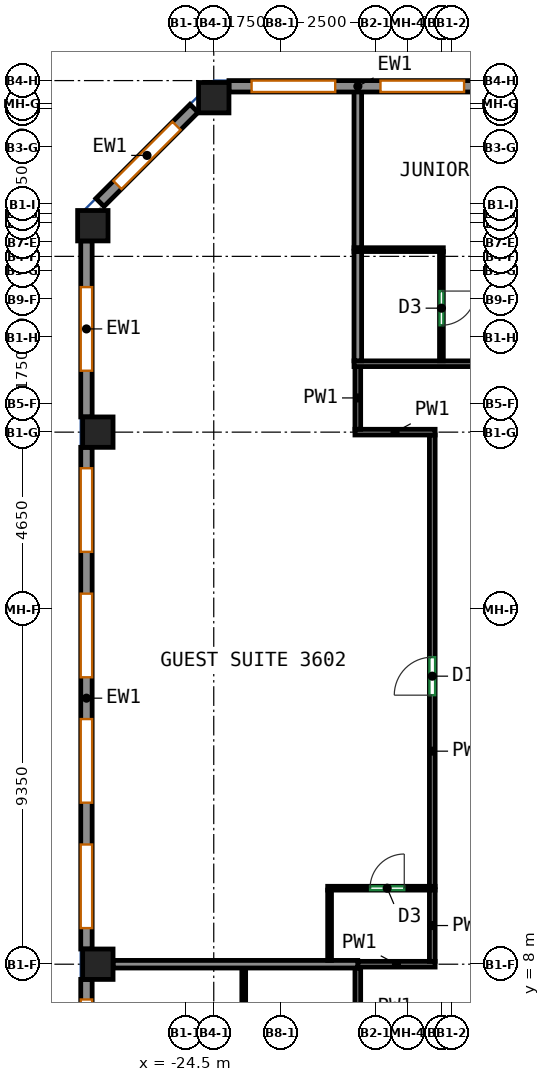
"""IFC4 building model, lengths in metres.
Left out: names, types, materials, properties, quantities, classifications, styles, units other than length and angle.
Written with IfcOpenShell. Run it as: python <this file> out.ifc"""

import sys

from ifc_helpers import new_model, si_unit, direction, frame, frame_2d, origin, origin_2d, place, context, subcontext, project, spatial, rectangle, extrude, source, transform, mapped, element, fill, save


model = new_model("IFC4")
c1 = context("Model", 3, precision=1e-05, world=origin(), true_north=direction((0.0, 1.0)))
c2 = subcontext(c1, "Body", "Model", "MODEL_VIEW")
j1 = project(units=[si_unit("LENGTHUNIT", "METRE"), si_unit("PLANEANGLEUNIT", "RADIAN")], contexts=[c1])
p1 = place(None, origin())
s1 = spatial("IfcSite", under=j1, at=p1, CompositionType="ELEMENT")
p2 = place(p1, origin())
s2 = spatial("IfcBuilding", under=s1, at=p2, CompositionType="ELEMENT")
p3 = place(p2, frame((0.0, 0.0, 157.5)))
s3 = spatial("IfcBuildingStorey", under=s2, at=p3, CompositionType="ELEMENT", Elevation=157.5)
m1 = source(origin(), c2, "Body", "SweptSolid", [
    extrude(rectangle(XDim=0.8, YDim=0.8, at=origin_2d()), origin(), (0.0, 0.0, 1.0), 3.12),
])
for number, where, z_axis, x_axis in (
    (1, (-26.932, 27.432, 0.0), (0.0, 0.0, 1.0), (1.0, 0.0, 0.0)),
    (2, (-26.8, 8.0, 0.0), (0.0, 0.0, 1.0), (1.0, 0.0, 0.0)),
    (3, (-26.8, 22.0, 0.0), (0.0, 0.0, 1.0), (1.0, 0.0, 0.0)),
    (4, (-23.75, 30.8, 0.0), (0.0, 0.0, 1.0), (1.0, 0.0, 0.0)),
):
    element("IfcColumn", number, at=place(p3, frame(where, z_axis=z_axis, x_axis=x_axis)), inside=s3, PredefinedType="COLUMN", context=c2, shape_type="MappedRepresentation", body=[
        mapped(m1, transform((0.0, 0.0, 0.0))),
    ])
m2 = source(origin(), c2, "Body", "SweptSolid", [
    extrude(rectangle(XDim=6.783, YDim=0.3, at=frame_2d((3.392, 0.0))), origin(), (0.0, 0.0, 1.0), 3.12),
])
p4 = place(p3, frame((-16.567, 31.1, 0.0), z_axis=(0.0, 0.0, 1.0), x_axis=(-1.0, 0.0, 0.0)))
e5 = element("IfcWall", 5, at=p4, inside=s3, PredefinedType="SOLIDWALL", context=c2, shape_type="MappedRepresentation", body=[
    mapped(m2, transform((0.0, 0.0, 0.0))),
])
p5 = place(p4, frame((0.596, 0.0, 0.85)))
e6 = element("IfcOpeningElement", 6, at=p5, cuts=e5, PredefinedType="OPENING", context=c2, shape_type="SweptSolid", body=[
    extrude(rectangle(XDim=2.2, YDim=1.95, at=frame_2d((1.1, 0.975))), frame((0.0, 0.16, 0.0), z_axis=(0.0, -1.0, 0.0), x_axis=(1.0, 0.0, 0.0)), (0.0, 0.0, 1.0), 0.32),
])
p6 = place(p4, frame((3.988, 0.0, 0.85)))
e7 = element("IfcOpeningElement", 7, at=p6, cuts=e5, PredefinedType="OPENING", context=c2, shape_type="SweptSolid", body=[
    extrude(rectangle(XDim=2.2, YDim=1.95, at=frame_2d((1.1, 0.975))), frame((0.0, 0.16, 0.0), z_axis=(0.0, -1.0, 0.0), x_axis=(1.0, 0.0, 0.0)), (0.0, 0.0, 1.0), 0.32),
])
m3 = source(origin(), c2, "Body", "SweptSolid", [
    extrude(rectangle(XDim=3.5, YDim=0.3, at=frame_2d((1.75, 0.0))), origin(), (0.0, 0.0, 1.0), 3.12),
])
p7 = place(p3, frame((-24.269, 30.519, 0.0), z_axis=(0.0, 0.0, 1.0), x_axis=(-0.707141656123, -0.70707190453, 0.0)))
e8 = element("IfcWall", 8, at=p7, inside=s3, PredefinedType="SOLIDWALL", context=c2, shape_type="MappedRepresentation", body=[
    mapped(m3, transform((0.0, 0.0, 0.0))),
])
p8 = place(p7, frame((0.65, 0.0, 0.85)))
e9 = element("IfcOpeningElement", 9, at=p8, cuts=e8, PredefinedType="OPENING", context=c2, shape_type="SweptSolid", body=[
    extrude(rectangle(XDim=2.2, YDim=1.95, at=frame_2d((1.1, 0.975))), frame((0.0, 0.16, 0.0), z_axis=(0.0, -1.0, 0.0), x_axis=(1.0, 0.0, 0.0)), (0.0, 0.0, 1.0), 0.32),
])
m4 = source(origin(), c2, "Body", "SweptSolid", [
    extrude(rectangle(XDim=4.632, YDim=0.3, at=frame_2d((2.316, 0.0))), origin(), (0.0, 0.0, 1.0), 3.12),
])
p9 = place(p3, frame((-27.1, 27.032, 0.0), z_axis=(0.0, 0.0, 1.0), x_axis=(0.0, -1.0, 0.0)))
e10 = element("IfcWall", 10, at=p9, inside=s3, PredefinedType="SOLIDWALL", context=c2, shape_type="MappedRepresentation", body=[
    mapped(m4, transform((0.0, 0.0, 0.0))),
])
p10 = place(p9, frame((1.216, 0.0, 0.85)))
e11 = element("IfcOpeningElement", 11, at=p10, cuts=e10, PredefinedType="OPENING", context=c2, shape_type="SweptSolid", body=[
    extrude(rectangle(XDim=2.2, YDim=1.95, at=frame_2d((1.1, 0.975))), frame((0.0, 0.16, 0.0), z_axis=(0.0, -1.0, 0.0), x_axis=(1.0, 0.0, 0.0)), (0.0, 0.0, 1.0), 0.32),
])
m5 = source(origin(), c2, "Body", "SweptSolid", [
    extrude(rectangle(XDim=13.2, YDim=0.3, at=frame_2d((6.6, 0.0))), origin(), (0.0, 0.0, 1.0), 3.12),
])
p11 = place(p3, frame((-27.1, 21.6, 0.0), z_axis=(0.0, 0.0, 1.0), x_axis=(0.0, -1.0, 0.0)))
e12 = element("IfcWall", 12, at=p11, inside=s3, PredefinedType="SOLIDWALL", context=c2, shape_type="MappedRepresentation", body=[
    mapped(m5, transform((0.0, 0.0, 0.0))),
])
p12 = place(p11, frame((0.55, 0.0, 0.85)))
e13 = element("IfcOpeningElement", 13, at=p12, cuts=e12, PredefinedType="OPENING", context=c2, shape_type="SweptSolid", body=[
    extrude(rectangle(XDim=2.2, YDim=1.95, at=frame_2d((1.1, 0.975))), frame((0.0, 0.16, 0.0), z_axis=(0.0, -1.0, 0.0), x_axis=(1.0, 0.0, 0.0)), (0.0, 0.0, 1.0), 0.32),
])
p13 = place(p11, frame((3.85, 0.0, 0.85)))
e14 = element("IfcOpeningElement", 14, at=p13, cuts=e12, PredefinedType="OPENING", context=c2, shape_type="SweptSolid", body=[
    extrude(rectangle(XDim=2.2, YDim=1.95, at=frame_2d((1.1, 0.975))), frame((0.0, 0.16, 0.0), z_axis=(0.0, -1.0, 0.0), x_axis=(1.0, 0.0, 0.0)), (0.0, 0.0, 1.0), 0.32),
])
p14 = place(p11, frame((7.15, 0.0, 0.85)))
e15 = element("IfcOpeningElement", 15, at=p14, cuts=e12, PredefinedType="OPENING", context=c2, shape_type="SweptSolid", body=[
    extrude(rectangle(XDim=2.2, YDim=1.95, at=frame_2d((1.1, 0.975))), frame((0.0, 0.16, 0.0), z_axis=(0.0, -1.0, 0.0), x_axis=(1.0, 0.0, 0.0)), (0.0, 0.0, 1.0), 0.32),
])
p15 = place(p11, frame((10.45, 0.0, 0.85)))
e16 = element("IfcOpeningElement", 16, at=p15, cuts=e12, PredefinedType="OPENING", context=c2, shape_type="SweptSolid", body=[
    extrude(rectangle(XDim=2.2, YDim=1.95, at=frame_2d((1.1, 0.975))), frame((0.0, 0.16, 0.0), z_axis=(0.0, -1.0, 0.0), x_axis=(1.0, 0.0, 0.0)), (0.0, 0.0, 1.0), 0.32),
])
m6 = source(origin(), c2, "Body", "SweptSolid", [
    extrude(rectangle(XDim=6.513, YDim=0.3, at=frame_2d((3.256, 0.0))), origin(), (0.0, 0.0, 1.0), 3.12),
])
p16 = place(p3, frame((-27.1, 7.6, 0.0), z_axis=(0.0, 0.0, 1.0), x_axis=(0.0, -1.0, 0.0)))
e17 = element("IfcWall", 17, at=p16, inside=s3, PredefinedType="SOLIDWALL", context=c2, shape_type="MappedRepresentation", body=[
    mapped(m6, transform((0.0, 0.0, 0.0))),
])
p17 = place(p16, frame((0.528, 0.0, 0.85)))
e18 = element("IfcOpeningElement", 18, at=p17, cuts=e17, PredefinedType="OPENING", context=c2, shape_type="SweptSolid", body=[
    extrude(rectangle(XDim=2.2, YDim=1.95, at=frame_2d((1.1, 0.975))), frame((0.0, 0.16, 0.0), z_axis=(0.0, -1.0, 0.0), x_axis=(1.0, 0.0, 0.0)), (0.0, 0.0, 1.0), 0.32),
])
p18 = place(p16, frame((3.784, 0.0, 0.85)))
e19 = element("IfcOpeningElement", 19, at=p18, cuts=e17, PredefinedType="OPENING", context=c2, shape_type="SweptSolid", body=[
    extrude(rectangle(XDim=2.2, YDim=1.95, at=frame_2d((1.1, 0.975))), frame((0.0, 0.16, 0.0), z_axis=(0.0, -1.0, 0.0), x_axis=(1.0, 0.0, 0.0)), (0.0, 0.0, 1.0), 0.32),
])
p19 = place(p3, frame((-19.959, 5.84, 0.0), z_axis=(0.0, 0.0, 1.0), x_axis=(0.0, 1.0, 0.0)))
e20 = element("IfcWall", 20, at=p19, inside=s3, PredefinedType="PARTITIONING", context=c2, shape_type="SweptSolid", body=[
    extrude(rectangle(XDim=2.06, YDim=0.15, at=frame_2d((1.03, 0.0))), origin(), (0.0, 0.0, 1.0), 3.12),
])
p20 = place(p3, frame((-18.0, 10.04, 0.0), z_axis=(0.0, 0.0, 1.0), x_axis=(0.0, 1.0, 0.0)))
e21 = element("IfcWall", 21, at=p20, inside=s3, PredefinedType="PARTITIONING", context=c2, shape_type="SweptSolid", body=[
    extrude(rectangle(XDim=11.885, YDim=0.15, at=frame_2d((5.942, 0.0))), origin(), (0.0, 0.0, 1.0), 3.12),
])
p21 = place(p20, frame((5.039, 0.0, 0.0)))
e22 = element("IfcOpeningElement", 22, at=p21, cuts=e21, PredefinedType="OPENING", context=c2, shape_type="SweptSolid", body=[
    extrude(rectangle(XDim=1.0, YDim=2.1, at=frame_2d((0.5, 1.05))), frame((0.0, 0.085, 0.0), z_axis=(0.0, -1.0, 0.0), x_axis=(1.0, 0.0, 0.0)), (0.0, 0.0, 1.0), 0.17),
])
p22 = place(p3, frame((-20.034, 22.0, 0.0), z_axis=(0.0, 0.0, 1.0), x_axis=(1.0, 0.0, 0.0)))
e23 = element("IfcWall", 23, at=p22, inside=s3, PredefinedType="PARTITIONING", context=c2, shape_type="SweptSolid", body=[
    extrude(rectangle(XDim=2.109, YDim=0.15, at=frame_2d((1.054, 0.0))), origin(), (0.0, 0.0, 1.0), 3.12),
])
p23 = place(p3, frame((-19.959, 22.075, 0.0), z_axis=(0.0, 0.0, 1.0), x_axis=(0.0, 1.0, 0.0)))
e24 = element("IfcWall", 24, at=p23, inside=s3, PredefinedType="PARTITIONING", context=c2, shape_type="SweptSolid", body=[
    extrude(rectangle(XDim=1.65, YDim=0.15, at=frame_2d((0.825, 0.0))), origin(), (0.0, 0.0, 1.0), 3.12),
])
p24 = place(p3, frame((-17.925, 8.0, 0.0), z_axis=(0.0, 0.0, 1.0), x_axis=(-1.0, 0.0, 0.0)))
e25 = element("IfcWall", 25, at=p24, inside=s3, PredefinedType="PARTITIONING", context=c2, shape_type="SweptSolid", body=[
    extrude(rectangle(XDim=2.034, YDim=0.15, at=frame_2d((1.017, 0.0))), origin(), (0.0, 0.0, 1.0), 3.12),
])
p25 = place(p3, frame((-18.0, 8.075, 0.0), z_axis=(0.0, 0.0, 1.0), x_axis=(0.0, 1.0, 0.0)))
e26 = element("IfcWall", 26, at=p25, inside=s3, PredefinedType="PARTITIONING", context=c2, shape_type="SweptSolid", body=[
    extrude(rectangle(XDim=1.885, YDim=0.15, at=frame_2d((0.942, 0.0))), origin(), (0.0, 0.0, 1.0), 3.12),
])
p26 = place(p3, frame((-20.059, 23.8, 0.0), z_axis=(0.0, 0.0, 1.0), x_axis=(1.0, 0.0, 0.0)))
e27 = element("IfcWall", 27, at=p26, inside=s3, PredefinedType="PARTITIONING", context=c2, shape_type="SweptSolid", body=[
    extrude(rectangle(XDim=41.909, YDim=0.15, at=frame_2d((20.955, 0.0))), origin(), (0.0, 0.0, 1.0), 3.12),
])
p27 = place(p26, frame((5.293, 0.0, 0.0)))
e28 = element("IfcOpeningElement", 28, at=p27, cuts=e27, PredefinedType="OPENING", context=c2, shape_type="SweptSolid", body=[
    extrude(rectangle(XDim=1.0, YDim=2.1, at=frame_2d((0.5, 1.05))), frame((0.0, 0.085, 0.0), z_axis=(0.0, -1.0, 0.0), x_axis=(1.0, 0.0, 0.0)), (0.0, 0.0, 1.0), 0.17),
])
p28 = place(p26, frame((9.275, 0.0, 0.0)))
e29 = element("IfcOpeningElement", 29, at=p28, cuts=e27, PredefinedType="OPENING", context=c2, shape_type="SweptSolid", body=[
    extrude(rectangle(XDim=1.0, YDim=2.1, at=frame_2d((0.5, 1.05))), frame((0.0, 0.085, 0.0), z_axis=(0.0, -1.0, 0.0), x_axis=(1.0, 0.0, 0.0)), (0.0, 0.0, 1.0), 0.17),
])
p29 = place(p26, frame((18.292, 0.0, 0.0)))
e30 = element("IfcOpeningElement", 30, at=p29, cuts=e27, PredefinedType="OPENING", context=c2, shape_type="SweptSolid", body=[
    extrude(rectangle(XDim=1.0, YDim=2.1, at=frame_2d((0.5, 1.05))), frame((0.0, 0.085, 0.0), z_axis=(0.0, -1.0, 0.0), x_axis=(1.0, 0.0, 0.0)), (0.0, 0.0, 1.0), 0.17),
])
p30 = place(p26, frame((30.636, 0.0, 0.0)))
e31 = element("IfcOpeningElement", 31, at=p30, cuts=e27, PredefinedType="OPENING", context=c2, shape_type="SweptSolid", body=[
    extrude(rectangle(XDim=1.0, YDim=2.1, at=frame_2d((0.5, 1.05))), frame((0.0, 0.085, 0.0), z_axis=(0.0, -1.0, 0.0), x_axis=(1.0, 0.0, 0.0)), (0.0, 0.0, 1.0), 0.17),
])
p31 = place(p26, frame((36.828, 0.0, 0.0)))
e32 = element("IfcOpeningElement", 32, at=p31, cuts=e27, PredefinedType="OPENING", context=c2, shape_type="SweptSolid", body=[
    extrude(rectangle(XDim=1.0, YDim=2.1, at=frame_2d((0.5, 1.05))), frame((0.0, 0.085, 0.0), z_axis=(0.0, -1.0, 0.0), x_axis=(1.0, 0.0, 0.0)), (0.0, 0.0, 1.0), 0.17),
])
p32 = place(p26, frame((38.314, 0.0, 0.0)))
e33 = element("IfcOpeningElement", 33, at=p32, cuts=e27, PredefinedType="OPENING", context=c2, shape_type="SweptSolid", body=[
    extrude(rectangle(XDim=1.0, YDim=2.1, at=frame_2d((0.5, 1.05))), frame((0.0, 0.085, 0.0), z_axis=(0.0, -1.0, 0.0), x_axis=(1.0, 0.0, 0.0)), (0.0, 0.0, 1.0), 0.17),
])
p33 = place(p3, frame((-22.961, 5.85, 0.0), z_axis=(0.0, 0.0, 1.0), x_axis=(0.0, 1.0, 0.0)))
e34 = element("IfcWall", 34, at=p33, inside=s3, PredefinedType="PARTITIONING", context=c2, shape_type="SweptSolid", body=[
    extrude(rectangle(XDim=2.05, YDim=0.1, at=frame_2d((1.025, 0.0))), origin(), (0.0, 0.0, 1.0), 3.12),
])
p34 = place(p3, frame((-26.4, 8.0, 0.0), z_axis=(0.0, 0.0, 1.0), x_axis=(1.0, 0.0, 0.0)))
e35 = element("IfcWall", 35, at=p34, inside=s3, PredefinedType="PARTITIONING", context=c2, shape_type="SweptSolid", body=[
    extrude(rectangle(XDim=6.439, YDim=0.2, at=frame_2d((3.219, 0.0))), origin(), (0.0, 0.0, 1.0), 3.12),
])
p35 = place(p3, frame((-20.752, 10.0, 0.0), z_axis=(0.0, 0.0, 1.0), x_axis=(1.0, 0.0, 0.0)))
e36 = element("IfcWall", 36, at=p35, inside=s3, PredefinedType="PARTITIONING", context=c2, shape_type="SweptSolid", body=[
    extrude(rectangle(XDim=2.825, YDim=0.1, at=frame_2d((1.413, 0.0))), origin(), (0.0, 0.0, 1.0), 3.12),
])
p36 = place(p35, frame((1.115, 0.0, 0.0)))
e37 = element("IfcOpeningElement", 37, at=p36, cuts=e36, PredefinedType="OPENING", context=c2, shape_type="SweptSolid", body=[
    extrude(rectangle(XDim=0.9, YDim=2.1, at=frame_2d((0.45, 1.05))), frame((0.0, 0.06, 0.0), z_axis=(0.0, -1.0, 0.0), x_axis=(1.0, 0.0, 0.0)), (0.0, 0.0, 1.0), 0.12),
])
p37 = place(p3, frame((-20.702, 8.1, 0.0), z_axis=(0.0, 0.0, 1.0), x_axis=(0.0, 1.0, 0.0)))
e38 = element("IfcWall", 38, at=p37, inside=s3, PredefinedType="PARTITIONING", context=c2, shape_type="SweptSolid", body=[
    extrude(rectangle(XDim=1.85, YDim=0.1, at=frame_2d((0.925, 0.0))), origin(), (0.0, 0.0, 1.0), 3.12),
])
p38 = place(p3, frame((-19.959, 26.842, 0.0), z_axis=(0.0, 0.0, 1.0), x_axis=(0.0, 1.0, 0.0)))
e39 = element("IfcWall", 39, at=p38, inside=s3, PredefinedType="PARTITIONING", context=c2, shape_type="SweptSolid", body=[
    extrude(rectangle(XDim=4.158, YDim=0.2, at=frame_2d((2.079, 0.0))), origin(), (0.0, 0.0, 1.0), 3.12),
])
p39 = place(p3, frame((-19.959, 23.877, 0.0), z_axis=(0.0, 0.0, 1.0), x_axis=(0.0, 1.0, 0.0)))
e40 = element("IfcWall", 40, at=p39, inside=s3, PredefinedType="PARTITIONING", context=c2, shape_type="SweptSolid", body=[
    extrude(rectangle(XDim=2.885, YDim=0.2, at=frame_2d((1.442, 0.0))), origin(), (0.0, 0.0, 1.0), 3.12),
])
p40 = place(p3, frame((-17.759, 26.752, 0.0), z_axis=(0.0, 0.0, 1.0), x_axis=(0.0, -1.0, 0.0)))
e41 = element("IfcWall", 41, at=p40, inside=s3, PredefinedType="PARTITIONING", context=c2, shape_type="SweptSolid", body=[
    extrude(rectangle(XDim=2.875, YDim=0.1, at=frame_2d((1.438, 0.0))), origin(), (0.0, 0.0, 1.0), 3.12),
])
p41 = place(p40, frame((1.04, 0.0, 0.0)))
e42 = element("IfcOpeningElement", 42, at=p41, cuts=e41, PredefinedType="OPENING", context=c2, shape_type="SweptSolid", body=[
    extrude(rectangle(XDim=0.9, YDim=2.1, at=frame_2d((0.45, 1.05))), frame((0.0, 0.06, 0.0), z_axis=(0.0, -1.0, 0.0), x_axis=(1.0, 0.0, 0.0)), (0.0, 0.0, 1.0), 0.12),
])
p42 = place(p3, frame((-20.059, 26.802, 0.0), z_axis=(0.0, 0.0, 1.0), x_axis=(1.0, 0.0, 0.0)))
e43 = element("IfcWall", 43, at=p42, inside=s3, PredefinedType="PARTITIONING", context=c2, shape_type="SweptSolid", body=[
    extrude(rectangle(XDim=2.35, YDim=0.1, at=frame_2d((1.175, 0.0))), origin(), (0.0, 0.0, 1.0), 3.12),
])
p43 = place(p5, origin())
e44 = element("IfcWindow", 44, at=p43, inside=s3, PartitioningType="SINGLE_PANEL", PredefinedType="WINDOW", context=c2, shape_type="SweptSolid", body=[
    extrude(rectangle(XDim=2.2, YDim=1.95, at=frame_2d((1.1, 0.975))), frame((0.0, 0.03, 0.0), z_axis=(0.0, -1.0, 0.0), x_axis=(1.0, 0.0, 0.0)), (0.0, 0.0, 1.0), 0.06),
])
fill(e6, e44)
p44 = place(p6, origin())
e45 = element("IfcWindow", 45, at=p44, inside=s3, PartitioningType="SINGLE_PANEL", PredefinedType="WINDOW", context=c2, shape_type="SweptSolid", body=[
    extrude(rectangle(XDim=2.2, YDim=1.95, at=frame_2d((1.1, 0.975))), frame((0.0, 0.03, 0.0), z_axis=(0.0, -1.0, 0.0), x_axis=(1.0, 0.0, 0.0)), (0.0, 0.0, 1.0), 0.06),
])
fill(e7, e45)
p45 = place(p8, origin())
e46 = element("IfcWindow", 46, at=p45, inside=s3, PartitioningType="SINGLE_PANEL", PredefinedType="WINDOW", context=c2, shape_type="SweptSolid", body=[
    extrude(rectangle(XDim=2.2, YDim=1.95, at=frame_2d((1.1, 0.975))), frame((0.0, 0.03, 0.0), z_axis=(0.0, -1.0, 0.0), x_axis=(1.0, 0.0, 0.0)), (0.0, 0.0, 1.0), 0.06),
])
fill(e9, e46)
p46 = place(p10, origin())
e47 = element("IfcWindow", 47, at=p46, inside=s3, PartitioningType="SINGLE_PANEL", PredefinedType="WINDOW", context=c2, shape_type="SweptSolid", body=[
    extrude(rectangle(XDim=2.2, YDim=1.95, at=frame_2d((1.1, 0.975))), frame((0.0, 0.03, 0.0), z_axis=(0.0, -1.0, 0.0), x_axis=(1.0, 0.0, 0.0)), (0.0, 0.0, 1.0), 0.06),
])
fill(e11, e47)
p47 = place(p12, origin())
e48 = element("IfcWindow", 48, at=p47, inside=s3, PartitioningType="SINGLE_PANEL", PredefinedType="WINDOW", context=c2, shape_type="SweptSolid", body=[
    extrude(rectangle(XDim=2.2, YDim=1.95, at=frame_2d((1.1, 0.975))), frame((0.0, 0.03, 0.0), z_axis=(0.0, -1.0, 0.0), x_axis=(1.0, 0.0, 0.0)), (0.0, 0.0, 1.0), 0.06),
])
fill(e13, e48)
p48 = place(p13, origin())
e49 = element("IfcWindow", 49, at=p48, inside=s3, PartitioningType="SINGLE_PANEL", PredefinedType="WINDOW", context=c2, shape_type="SweptSolid", body=[
    extrude(rectangle(XDim=2.2, YDim=1.95, at=frame_2d((1.1, 0.975))), frame((0.0, 0.03, 0.0), z_axis=(0.0, -1.0, 0.0), x_axis=(1.0, 0.0, 0.0)), (0.0, 0.0, 1.0), 0.06),
])
fill(e14, e49)
p49 = place(p14, origin())
e50 = element("IfcWindow", 50, at=p49, inside=s3, PartitioningType="SINGLE_PANEL", PredefinedType="WINDOW", context=c2, shape_type="SweptSolid", body=[
    extrude(rectangle(XDim=2.2, YDim=1.95, at=frame_2d((1.1, 0.975))), frame((0.0, 0.03, 0.0), z_axis=(0.0, -1.0, 0.0), x_axis=(1.0, 0.0, 0.0)), (0.0, 0.0, 1.0), 0.06),
])
fill(e15, e50)
p50 = place(p15, origin())
e51 = element("IfcWindow", 51, at=p50, inside=s3, PartitioningType="SINGLE_PANEL", PredefinedType="WINDOW", context=c2, shape_type="SweptSolid", body=[
    extrude(rectangle(XDim=2.2, YDim=1.95, at=frame_2d((1.1, 0.975))), frame((0.0, 0.03, 0.0), z_axis=(0.0, -1.0, 0.0), x_axis=(1.0, 0.0, 0.0)), (0.0, 0.0, 1.0), 0.06),
])
fill(e16, e51)
p51 = place(p17, origin())
e52 = element("IfcWindow", 52, at=p51, inside=s3, PartitioningType="SINGLE_PANEL", PredefinedType="WINDOW", context=c2, shape_type="SweptSolid", body=[
    extrude(rectangle(XDim=2.2, YDim=1.95, at=frame_2d((1.1, 0.975))), frame((0.0, 0.03, 0.0), z_axis=(0.0, -1.0, 0.0), x_axis=(1.0, 0.0, 0.0)), (0.0, 0.0, 1.0), 0.06),
])
fill(e18, e52)
p52 = place(p36, origin())
e53 = element("IfcDoor", 53, at=p52, inside=s3, OperationType="SINGLE_SWING_RIGHT", PredefinedType="DOOR", context=c2, shape_type="SweptSolid", body=[
    extrude(rectangle(XDim=0.9, YDim=2.1, at=frame_2d((0.45, 1.05))), frame((0.0, 0.025, 0.0), z_axis=(0.0, -1.0, 0.0), x_axis=(1.0, 0.0, 0.0)), (0.0, 0.0, 1.0), 0.05),
])
fill(e37, e53)
p53 = place(p21, origin())
e54 = element("IfcDoor", 54, at=p53, inside=s3, OperationType="SINGLE_SWING_LEFT", PredefinedType="DOOR", context=c2, shape_type="SweptSolid", body=[
    extrude(rectangle(XDim=1.0, YDim=2.1, at=frame_2d((0.5, 1.05))), frame((0.0, 0.025, 0.0), z_axis=(0.0, -1.0, 0.0), x_axis=(1.0, 0.0, 0.0)), (0.0, 0.0, 1.0), 0.05),
])
fill(e22, e54)
p54 = place(p41, origin())
e55 = element("IfcDoor", 55, at=p54, inside=s3, OperationType="SINGLE_SWING_LEFT", PredefinedType="DOOR", context=c2, shape_type="SweptSolid", body=[
    extrude(rectangle(XDim=0.9, YDim=2.1, at=frame_2d((0.45, 1.05))), frame((0.0, 0.025, 0.0), z_axis=(0.0, -1.0, 0.0), x_axis=(1.0, 0.0, 0.0)), (0.0, 0.0, 1.0), 0.05),
])
fill(e42, e55)
save(model, sys.argv[1])
